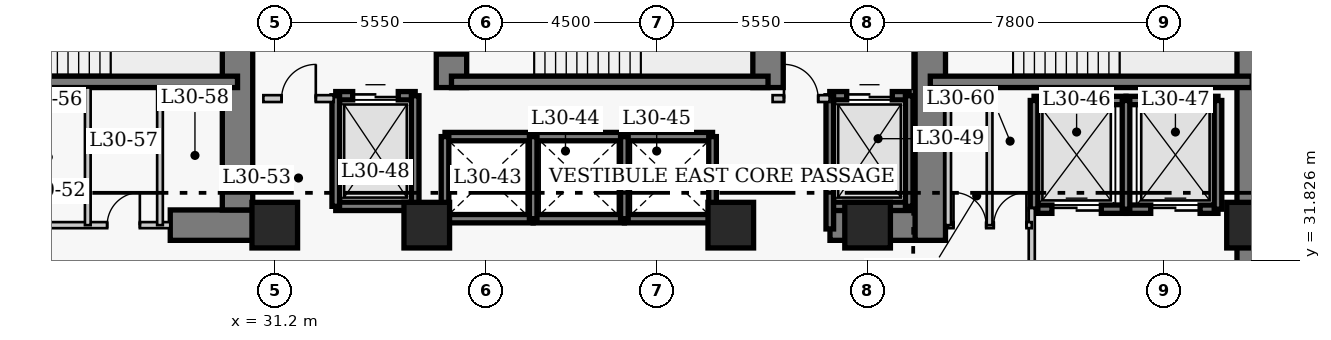
"""IFC4 building model, lengths in metres.
Left out: names, types, materials, properties, quantities, classifications, styles, units other than length and angle.
Written with IfcOpenShell. Run it as: python <this file> out.ifc"""

import sys

from ifc_helpers import new_model, si_unit, direction, frame, frame_2d, origin, origin_2d, place, context, subcontext, project, spatial, rectangle, extrude, element, fill, save


model = new_model("IFC4")
c1 = context("Model", 3, precision=1e-05, world=origin(), true_north=direction((0.0, 1.0)))
c2 = subcontext(c1, "Body", "Model", "MODEL_VIEW")
j1 = project(units=[si_unit("LENGTHUNIT", "METRE"), si_unit("PLANEANGLEUNIT", "RADIAN")], contexts=[c1])
p1 = place(None, origin())
s1 = spatial("IfcSite", under=j1, at=p1, CompositionType="ELEMENT")
p2 = place(p1, origin())
s2 = spatial("IfcBuilding", under=s1, at=p2, CompositionType="ELEMENT")
p3 = place(p2, frame((0.0, 0.0, 122.2)))
s3 = spatial("IfcBuildingStorey", under=s2, at=p3, CompositionType="ELEMENT", Elevation=122.2)
p4 = place(p3, frame((56.92, 27.05, 0.0), z_axis=(0.0, 0.0, 1.0), x_axis=(0.0, 1.0, 0.0)))
e1 = element("IfcWall", 1, at=p4, inside=s3, PredefinedType="SHEAR", context=c2, shape_type="SweptSolid", body=[
    extrude(rectangle(XDim=13.67, YDim=0.8, at=frame_2d((6.835, 0.0))), origin(), (0.0, 0.0, 1.0), 3.8),
])
p5 = place(p3, frame((28.45, 32.75, 0.0), z_axis=(0.0, 0.0, 1.0), x_axis=(1.0, 0.0, 0.0)))
e2 = element("IfcWall", 2, at=p5, inside=s3, PredefinedType="SHEAR", context=c2, shape_type="SweptSolid", body=[
    extrude(rectangle(XDim=2.4, YDim=0.8, at=frame_2d((1.2, 0.0))), origin(), (0.0, 0.0, 1.0), 3.8),
])
p6 = place(p3, frame((45.81, 32.75, 0.0), z_axis=(0.0, 0.0, 1.0), x_axis=(1.0, 0.0, 0.0)))
e3 = element("IfcWall", 3, at=p6, inside=s3, PredefinedType="SHEAR", context=c2, shape_type="SweptSolid", body=[
    extrude(rectangle(XDim=2.64, YDim=0.8, at=frame_2d((1.32, 0.0))), origin(), (0.0, 0.0, 1.0), 3.8),
])
p7 = place(p3, frame((30.22, 33.15, 0.0), z_axis=(0.0, 0.0, 1.0), x_axis=(0.0, 1.0, 0.0)))
e4 = element("IfcWall", 4, at=p7, inside=s3, PredefinedType="SHEAR", context=c2, shape_type="SweptSolid", body=[
    extrude(rectangle(XDim=7.17, YDim=0.8, at=frame_2d((3.585, 0.0))), origin(), (0.0, 0.0, 1.0), 3.8),
])
p8 = place(p3, frame((35.85, 36.37, 0.0), z_axis=(0.0, 0.0, 1.0), x_axis=(0.0, 1.0, 0.0)))
e5 = element("IfcWall", 5, at=p8, inside=s3, PredefinedType="SHEAR", context=c2, shape_type="SweptSolid", body=[
    extrude(rectangle(XDim=3.95, YDim=0.8, at=frame_2d((1.975, 0.0))), origin(), (0.0, 0.0, 1.0), 3.8),
])
p9 = place(p8, frame((0.88, 0.0, 0.0)))
e6 = element("IfcOpeningElement", 6, at=p9, cuts=e5, PredefinedType="OPENING", context=c2, shape_type="SweptSolid", body=[
    extrude(rectangle(XDim=1.1, YDim=2.15, at=frame_2d((0.55, 1.075))), frame((0.0, 0.41, 0.0), z_axis=(0.0, -1.0, 0.0), x_axis=(1.0, 0.0, 0.0)), (0.0, 0.0, 1.0), 0.82),
])
p10 = place(p3, frame((44.18, 36.37, 0.0), z_axis=(0.0, 0.0, 1.0), x_axis=(0.0, 1.0, 0.0)))
e7 = element("IfcWall", 7, at=p10, inside=s3, PredefinedType="SHEAR", context=c2, shape_type="SweptSolid", body=[
    extrude(rectangle(XDim=3.95, YDim=0.8, at=frame_2d((1.975, 0.0))), origin(), (0.0, 0.0, 1.0), 3.8),
])
p11 = place(p3, frame((48.45, 32.35, 0.0), z_axis=(0.0, 0.0, 1.0), x_axis=(0.0, 1.0, 0.0)))
e8 = element("IfcWall", 8, at=p11, inside=s3, PredefinedType="SHEAR", context=c2, shape_type="SweptSolid", body=[
    extrude(rectangle(XDim=7.97, YDim=0.8, at=frame_2d((3.985, 0.0))), origin(), (0.0, 0.0, 1.0), 3.8),
])
p12 = place(p11, frame((5.85, 0.0, 0.0)))
e9 = element("IfcOpeningElement", 9, at=p12, cuts=e8, PredefinedType="OPENING", context=c2, shape_type="SweptSolid", body=[
    extrude(rectangle(XDim=1.1, YDim=2.15, at=frame_2d((0.55, 1.075))), frame((0.0, 0.41, 0.0), z_axis=(0.0, -1.0, 0.0), x_axis=(1.0, 0.0, 0.0)), (0.0, 0.0, 1.0), 0.82),
])
p13 = place(p3, frame((21.9, 36.52, 0.0), z_axis=(0.0, 0.0, 1.0), x_axis=(1.0, 0.0, 0.0)))
e10 = element("IfcWall", 10, at=p13, inside=s3, PredefinedType="SHEAR", context=c2, shape_type="SweptSolid", body=[
    extrude(rectangle(XDim=8.32, YDim=0.3, at=frame_2d((4.16, 0.0))), origin(), (0.0, 0.0, 1.0), 3.8),
])
p14 = place(p13, frame((0.9, 0.0, 0.0)))
e11 = element("IfcOpeningElement", 11, at=p14, cuts=e10, PredefinedType="OPENING", context=c2, shape_type="SweptSolid", body=[
    extrude(rectangle(XDim=1.1, YDim=2.15, at=frame_2d((0.55, 1.075))), frame((0.0, 0.16, 0.0), z_axis=(0.0, -1.0, 0.0), x_axis=(1.0, 0.0, 0.0)), (0.0, 0.0, 1.0), 0.32),
])
p15 = place(p3, frame((35.85, 36.52, 0.0), z_axis=(0.0, 0.0, 1.0), x_axis=(1.0, 0.0, 0.0)))
e12 = element("IfcWall", 12, at=p15, inside=s3, PredefinedType="SHEAR", context=c2, shape_type="SweptSolid", body=[
    extrude(rectangle(XDim=8.33, YDim=0.3, at=frame_2d((4.165, 0.0))), origin(), (0.0, 0.0, 1.0), 3.8),
])
p16 = place(p3, frame((48.45, 36.52, 0.0), z_axis=(0.0, 0.0, 1.0), x_axis=(1.0, 0.0, 0.0)))
e13 = element("IfcWall", 13, at=p16, inside=s3, PredefinedType="SHEAR", context=c2, shape_type="SweptSolid", body=[
    extrude(rectangle(XDim=8.47, YDim=0.3, at=frame_2d((4.235, 0.0))), origin(), (0.0, 0.0, 1.0), 3.8),
])
for number, where, z_axis, x_axis in (
    (14, (31.2, 32.75, 0.0), (0.0, 0.0, 1.0), (1.0, 0.0, 0.0)),
    (15, (35.2, 32.75, 0.0), (0.0, 0.0, 1.0), (1.0, 0.0, 0.0)),
    (16, (43.2, 32.75, 0.0), (0.0, 0.0, 1.0), (1.0, 0.0, 0.0)),
    (17, (46.8, 32.75, 0.0), (0.0, 0.0, 1.0), (1.0, 0.0, 0.0)),
    (18, (56.85, 32.75, 0.0), (0.0, 0.0, 1.0), (1.0, 0.0, 0.0)),
):
    element("IfcColumn", number, at=place(p3, frame(where, z_axis=z_axis, x_axis=x_axis)), inside=s3, PredefinedType="COLUMN", context=c2, shape_type="SweptSolid", body=[
        extrude(rectangle(XDim=1.2, YDim=1.2, at=origin_2d()), origin(), (0.0, 0.0, 1.0), 3.8),
    ])
for number, where, z_axis, x_axis in (
    (19, (35.68, 35.08, 0.0), (0.0, 0.0, 1.0), (1.0, 0.0, 0.0)),
    (20, (35.68, 32.92, 0.0), (0.0, 0.0, 1.0), (1.0, 0.0, 0.0)),
):
    element("IfcWall", number, at=place(p3, frame(where, z_axis=z_axis, x_axis=x_axis)), inside=s3, PredefinedType="SHEAR", context=c2, shape_type="SweptSolid", body=[
        extrude(rectangle(XDim=2.32, YDim=0.22, at=frame_2d((1.16, 0.0))), origin(), (0.0, 0.0, 1.0), 3.8),
    ])
p17 = place(p3, frame((35.68, 32.92, 0.0), z_axis=(0.0, 0.0, 1.0), x_axis=(0.0, 1.0, 0.0)))
e21 = element("IfcWall", 21, at=p17, inside=s3, PredefinedType="SHEAR", context=c2, shape_type="SweptSolid", body=[
    extrude(rectangle(XDim=2.16, YDim=0.2, at=frame_2d((1.08, 0.0))), origin(), (0.0, 0.0, 1.0), 3.8),
])
for number, where, z_axis, x_axis in (
    (22, (38.0, 35.08, 0.0), (0.0, 0.0, 1.0), (1.0, 0.0, 0.0)),
    (23, (38.0, 32.92, 0.0), (0.0, 0.0, 1.0), (1.0, 0.0, 0.0)),
):
    element("IfcWall", number, at=place(p3, frame(where, z_axis=z_axis, x_axis=x_axis)), inside=s3, PredefinedType="SHEAR", context=c2, shape_type="SweptSolid", body=[
        extrude(rectangle(XDim=2.4, YDim=0.22, at=frame_2d((1.2, 0.0))), origin(), (0.0, 0.0, 1.0), 3.8),
    ])
p18 = place(p3, frame((38.0, 32.92, 0.0), z_axis=(0.0, 0.0, 1.0), x_axis=(0.0, 1.0, 0.0)))
e24 = element("IfcWall", 24, at=p18, inside=s3, PredefinedType="SHEAR", context=c2, shape_type="SweptSolid", body=[
    extrude(rectangle(XDim=2.16, YDim=0.2, at=frame_2d((1.08, 0.0))), origin(), (0.0, 0.0, 1.0), 3.8),
])
for number, where, z_axis, x_axis in (
    (25, (40.4, 35.08, 0.0), (0.0, 0.0, 1.0), (1.0, 0.0, 0.0)),
    (26, (40.4, 32.92, 0.0), (0.0, 0.0, 1.0), (1.0, 0.0, 0.0)),
):
    element("IfcWall", number, at=place(p3, frame(where, z_axis=z_axis, x_axis=x_axis)), inside=s3, PredefinedType="SHEAR", context=c2, shape_type="SweptSolid", body=[
        extrude(rectangle(XDim=2.32, YDim=0.22, at=frame_2d((1.16, 0.0))), origin(), (0.0, 0.0, 1.0), 3.8),
    ])
for number, where, z_axis, x_axis in (
    (27, (40.4, 32.92, 0.0), (0.0, 0.0, 1.0), (0.0, 1.0, 0.0)),
    (28, (42.72, 32.92, 0.0), (0.0, 0.0, 1.0), (0.0, 1.0, 0.0)),
):
    element("IfcWall", number, at=place(p3, frame(where, z_axis=z_axis, x_axis=x_axis)), inside=s3, PredefinedType="SHEAR", context=c2, shape_type="SweptSolid", body=[
        extrude(rectangle(XDim=2.16, YDim=0.2, at=frame_2d((1.08, 0.0))), origin(), (0.0, 0.0, 1.0), 3.8),
    ])
p19 = place(p3, frame((51.18, 36.03, 0.0), z_axis=(0.0, 0.0, 1.0), x_axis=(1.0, 0.0, 0.0)))
e29 = element("IfcWall", 29, at=p19, inside=s3, PredefinedType="SHEAR", context=c2, shape_type="SweptSolid", body=[
    extrude(rectangle(XDim=2.42, YDim=0.22, at=frame_2d((1.21, 0.0))), origin(), (0.0, 0.0, 1.0), 3.8),
])
p20 = place(p3, frame((51.18, 33.17, 0.0), z_axis=(0.0, 0.0, 1.0), x_axis=(1.0, 0.0, 0.0)))
e30 = element("IfcWall", 30, at=p20, inside=s3, PredefinedType="SHEAR", context=c2, shape_type="SweptSolid", body=[
    extrude(rectangle(XDim=2.42, YDim=0.22, at=frame_2d((1.21, 0.0))), origin(), (0.0, 0.0, 1.0), 3.8),
])
p21 = place(p20, frame((0.47, 0.0, 0.0)))
e31 = element("IfcOpeningElement", 31, at=p21, cuts=e30, PredefinedType="OPENING", context=c2, shape_type="SweptSolid", body=[
    extrude(rectangle(XDim=1.3, YDim=2.15, at=frame_2d((0.65, 1.075))), frame((0.0, 0.12, 0.0), z_axis=(0.0, -1.0, 0.0), x_axis=(1.0, 0.0, 0.0)), (0.0, 0.0, 1.0), 0.24),
])
p22 = place(p3, frame((51.18, 33.17, 0.0), z_axis=(0.0, 0.0, 1.0), x_axis=(0.0, 1.0, 0.0)))
e32 = element("IfcWall", 32, at=p22, inside=s3, PredefinedType="SHEAR", context=c2, shape_type="SweptSolid", body=[
    extrude(rectangle(XDim=2.86, YDim=0.2, at=frame_2d((1.43, 0.0))), origin(), (0.0, 0.0, 1.0), 3.8),
])
p23 = place(p3, frame((53.6, 36.03, 0.0), z_axis=(0.0, 0.0, 1.0), x_axis=(1.0, 0.0, 0.0)))
e33 = element("IfcWall", 33, at=p23, inside=s3, PredefinedType="SHEAR", context=c2, shape_type="SweptSolid", body=[
    extrude(rectangle(XDim=2.42, YDim=0.22, at=frame_2d((1.21, 0.0))), origin(), (0.0, 0.0, 1.0), 3.8),
])
p24 = place(p3, frame((53.6, 33.17, 0.0), z_axis=(0.0, 0.0, 1.0), x_axis=(1.0, 0.0, 0.0)))
e34 = element("IfcWall", 34, at=p24, inside=s3, PredefinedType="SHEAR", context=c2, shape_type="SweptSolid", body=[
    extrude(rectangle(XDim=2.42, YDim=0.22, at=frame_2d((1.21, 0.0))), origin(), (0.0, 0.0, 1.0), 3.8),
])
p25 = place(p24, frame((0.65, 0.0, 0.0)))
e35 = element("IfcOpeningElement", 35, at=p25, cuts=e34, PredefinedType="OPENING", context=c2, shape_type="SweptSolid", body=[
    extrude(rectangle(XDim=1.3, YDim=2.15, at=frame_2d((0.65, 1.075))), frame((0.0, 0.12, 0.0), z_axis=(0.0, -1.0, 0.0), x_axis=(1.0, 0.0, 0.0)), (0.0, 0.0, 1.0), 0.24),
])
for number, where, z_axis, x_axis in (
    (36, (53.6, 33.17, 0.0), (0.0, 0.0, 1.0), (0.0, 1.0, 0.0)),
    (37, (56.02, 33.17, 0.0), (0.0, 0.0, 1.0), (0.0, 1.0, 0.0)),
):
    element("IfcWall", number, at=place(p3, frame(where, z_axis=z_axis, x_axis=x_axis)), inside=s3, PredefinedType="SHEAR", context=c2, shape_type="SweptSolid", body=[
        extrude(rectangle(XDim=2.86, YDim=0.2, at=frame_2d((1.43, 0.0))), origin(), (0.0, 0.0, 1.0), 3.8),
    ])
p26 = place(p3, frame((32.805, 36.155, 0.0), z_axis=(0.0, 0.0, 1.0), x_axis=(1.0, 0.0, 0.0)))
e38 = element("IfcWall", 38, at=p26, inside=s3, PredefinedType="SHEAR", context=c2, shape_type="SweptSolid", body=[
    extrude(rectangle(XDim=2.09, YDim=0.22, at=frame_2d((1.045, 0.0))), origin(), (0.0, 0.0, 1.0), 3.8),
])
p27 = place(p26, frame((0.445, 0.0, 0.0)))
e39 = element("IfcOpeningElement", 39, at=p27, cuts=e38, PredefinedType="OPENING", context=c2, shape_type="SweptSolid", body=[
    extrude(rectangle(XDim=1.2, YDim=2.15, at=frame_2d((0.6, 1.075))), frame((0.0, 0.12, 0.0), z_axis=(0.0, -1.0, 0.0), x_axis=(1.0, 0.0, 0.0)), (0.0, 0.0, 1.0), 0.24),
])
p28 = place(p3, frame((32.805, 33.245, 0.0), z_axis=(0.0, 0.0, 1.0), x_axis=(1.0, 0.0, 0.0)))
e40 = element("IfcWall", 40, at=p28, inside=s3, PredefinedType="SHEAR", context=c2, shape_type="SweptSolid", body=[
    extrude(rectangle(XDim=2.09, YDim=0.22, at=frame_2d((1.045, 0.0))), origin(), (0.0, 0.0, 1.0), 3.8),
])
for number, where, z_axis, x_axis in (
    (41, (32.805, 33.245, 0.0), (0.0, 0.0, 1.0), (0.0, 1.0, 0.0)),
    (42, (34.895, 33.245, 0.0), (0.0, 0.0, 1.0), (0.0, 1.0, 0.0)),
):
    element("IfcWall", number, at=place(p3, frame(where, z_axis=z_axis, x_axis=x_axis)), inside=s3, PredefinedType="SHEAR", context=c2, shape_type="SweptSolid", body=[
        extrude(rectangle(XDim=2.91, YDim=0.2, at=frame_2d((1.455, 0.0))), origin(), (0.0, 0.0, 1.0), 3.8),
    ])
p29 = place(p3, frame((45.805, 36.155, 0.0), z_axis=(0.0, 0.0, 1.0), x_axis=(1.0, 0.0, 0.0)))
e43 = element("IfcWall", 43, at=p29, inside=s3, PredefinedType="SHEAR", context=c2, shape_type="SweptSolid", body=[
    extrude(rectangle(XDim=2.09, YDim=0.22, at=frame_2d((1.045, 0.0))), origin(), (0.0, 0.0, 1.0), 3.8),
])
p30 = place(p29, frame((0.445, 0.0, 0.0)))
e44 = element("IfcOpeningElement", 44, at=p30, cuts=e43, PredefinedType="OPENING", context=c2, shape_type="SweptSolid", body=[
    extrude(rectangle(XDim=1.2, YDim=2.15, at=frame_2d((0.6, 1.075))), frame((0.0, 0.12, 0.0), z_axis=(0.0, -1.0, 0.0), x_axis=(1.0, 0.0, 0.0)), (0.0, 0.0, 1.0), 0.24),
])
p31 = place(p3, frame((45.805, 33.245, 0.0), z_axis=(0.0, 0.0, 1.0), x_axis=(1.0, 0.0, 0.0)))
e45 = element("IfcWall", 45, at=p31, inside=s3, PredefinedType="SHEAR", context=c2, shape_type="SweptSolid", body=[
    extrude(rectangle(XDim=2.09, YDim=0.22, at=frame_2d((1.045, 0.0))), origin(), (0.0, 0.0, 1.0), 3.8),
])
p32 = place(p3, frame((45.805, 32.65, 0.0), z_axis=(0.0, 0.0, 1.0), x_axis=(0.0, 1.0, 0.0)))
e46 = element("IfcWall", 46, at=p32, inside=s3, PredefinedType="SHEAR", context=c2, shape_type="SweptSolid", body=[
    extrude(rectangle(XDim=3.505, YDim=0.2, at=frame_2d((1.752, 0.0))), origin(), (0.0, 0.0, 1.0), 3.8),
])
p33 = place(p3, frame((47.895, 33.245, 0.0), z_axis=(0.0, 0.0, 1.0), x_axis=(0.0, 1.0, 0.0)))
e47 = element("IfcWall", 47, at=p33, inside=s3, PredefinedType="SHEAR", context=c2, shape_type="SweptSolid", body=[
    extrude(rectangle(XDim=2.91, YDim=0.2, at=frame_2d((1.455, 0.0))), origin(), (0.0, 0.0, 1.0), 3.8),
])
p34 = place(p3, frame((30.9, 36.08, 0.0), z_axis=(0.0, 0.0, 1.0), x_axis=(1.0, 0.0, 0.0)))
e48 = element("IfcWall", 48, at=p34, inside=s3, PredefinedType="PARTITIONING", context=c2, shape_type="SweptSolid", body=[
    extrude(rectangle(XDim=1.85, YDim=0.18, at=frame_2d((0.925, 0.0))), origin(), (0.0, 0.0, 1.0), 3.54),
])
p35 = place(p34, frame((0.48, 0.0, 0.0)))
e49 = element("IfcOpeningElement", 49, at=p35, cuts=e48, PredefinedType="OPENING", context=c2, shape_type="SweptSolid", body=[
    extrude(rectangle(XDim=0.9, YDim=2.15, at=frame_2d((0.45, 1.075))), frame((0.0, 0.1, 0.0), z_axis=(0.0, -1.0, 0.0), x_axis=(1.0, 0.0, 0.0)), (0.0, 0.0, 1.0), 0.2),
])
p36 = place(p3, frame((44.3, 36.08, 0.0), z_axis=(0.0, 0.0, 1.0), x_axis=(1.0, 0.0, 0.0)))
e50 = element("IfcWall", 50, at=p36, inside=s3, PredefinedType="PARTITIONING", context=c2, shape_type="SweptSolid", body=[
    extrude(rectangle(XDim=1.5, YDim=0.18, at=frame_2d((0.75, 0.0))), origin(), (0.0, 0.0, 1.0), 3.54),
])
p37 = place(p36, frame((0.3, 0.0, 0.0)))
e51 = element("IfcOpeningElement", 51, at=p37, cuts=e50, PredefinedType="OPENING", context=c2, shape_type="SweptSolid", body=[
    extrude(rectangle(XDim=0.9, YDim=2.15, at=frame_2d((0.45, 1.075))), frame((0.0, 0.1, 0.0), z_axis=(0.0, -1.0, 0.0), x_axis=(1.0, 0.0, 0.0)), (0.0, 0.0, 1.0), 0.2),
])
p38 = place(p3, frame((51.12, 29.5, 0.0), z_axis=(0.0, 0.0, 1.0), x_axis=(0.0, 1.0, 0.0)))
e52 = element("IfcWall", 52, at=p38, inside=s3, PredefinedType="PARTITIONING", context=c2, shape_type="SweptSolid", body=[
    extrude(rectangle(XDim=3.7, YDim=0.16, at=frame_2d((1.85, 0.0))), origin(), (0.0, 0.0, 1.0), 3.54),
])
p39 = place(p38, frame((0.9, 0.0, 0.0)))
e53 = element("IfcOpeningElement", 53, at=p39, cuts=e52, PredefinedType="OPENING", context=c2, shape_type="SweptSolid", body=[
    extrude(rectangle(XDim=1.1, YDim=2.15, at=frame_2d((0.55, 1.075))), frame((0.0, 0.09, 0.0), z_axis=(0.0, -1.0, 0.0), x_axis=(1.0, 0.0, 0.0)), (0.0, 0.0, 1.0), 0.18),
])
p40 = place(p3, frame((24.48, 32.75, 0.0), z_axis=(0.0, 0.0, 1.0), x_axis=(1.0, 0.0, 0.0)))
e54 = element("IfcWall", 54, at=p40, inside=s3, PredefinedType="PARTITIONING", context=c2, shape_type="SweptSolid", body=[
    extrude(rectangle(XDim=3.97, YDim=0.16, at=frame_2d((1.985, 0.0))), origin(), (0.0, 0.0, 1.0), 3.54),
])
p41 = place(p40, frame((2.31, 0.0, 0.0)))
e55 = element("IfcOpeningElement", 55, at=p41, cuts=e54, PredefinedType="OPENING", context=c2, shape_type="SweptSolid", body=[
    extrude(rectangle(XDim=0.86, YDim=2.05, at=frame_2d((0.43, 1.025))), frame((0.0, 0.09, 0.0), z_axis=(0.0, -1.0, 0.0), x_axis=(1.0, 0.0, 0.0)), (0.0, 0.0, 1.0), 0.18),
])
p42 = place(p3, frame((48.92, 32.75, 0.0), z_axis=(0.0, 0.0, 1.0), x_axis=(1.0, 0.0, 0.0)))
e56 = element("IfcWall", 56, at=p42, inside=s3, PredefinedType="PARTITIONING", context=c2, shape_type="SweptSolid", body=[
    extrude(rectangle(XDim=2.2, YDim=0.16, at=frame_2d((1.1, 0.0))), origin(), (0.0, 0.0, 1.0), 3.54),
])
p43 = place(p42, frame((0.14, 0.0, 0.0)))
e57 = element("IfcOpeningElement", 57, at=p43, cuts=e56, PredefinedType="OPENING", context=c2, shape_type="SweptSolid", body=[
    extrude(rectangle(XDim=0.86, YDim=2.05, at=frame_2d((0.43, 1.025))), frame((0.0, 0.09, 0.0), z_axis=(0.0, -1.0, 0.0), x_axis=(1.0, 0.0, 0.0)), (0.0, 0.0, 1.0), 0.18),
])
p44 = place(p42, frame((1.2, 0.0, 0.0)))
e58 = element("IfcOpeningElement", 58, at=p44, cuts=e56, PredefinedType="OPENING", context=c2, shape_type="SweptSolid", body=[
    extrude(rectangle(XDim=0.86, YDim=2.05, at=frame_2d((0.43, 1.025))), frame((0.0, 0.09, 0.0), z_axis=(0.0, -1.0, 0.0), x_axis=(1.0, 0.0, 0.0)), (0.0, 0.0, 1.0), 0.18),
])
for number, where, z_axis, x_axis in (
    (59, (48.92, 32.75, 0.0), (0.0, 0.0, 1.0), (0.0, 1.0, 0.0)),
    (60, (26.28, 32.75, 0.0), (0.0, 0.0, 1.0), (0.0, 1.0, 0.0)),
    (61, (28.18, 32.75, 0.0), (0.0, 0.0, 1.0), (0.0, 1.0, 0.0)),
    (62, (50.01, 32.75, 0.0), (0.0, 0.0, 1.0), (0.0, 1.0, 0.0)),
):
    element("IfcWall", number, at=place(p3, frame(where, z_axis=z_axis, x_axis=x_axis)), inside=s3, PredefinedType="PARTITIONING", context=c2, shape_type="SweptSolid", body=[
        extrude(rectangle(XDim=3.62, YDim=0.15, at=frame_2d((1.81, 0.0))), origin(), (0.0, 0.0, 1.0), 3.54),
    ])
p45 = place(p21, origin())
e63 = element("IfcDoor", 63, at=p45, inside=s3, OperationType="DOUBLE_DOOR_SLIDING", PredefinedType="DOOR", context=c2, shape_type="SweptSolid", body=[
    extrude(rectangle(XDim=1.3, YDim=2.15, at=frame_2d((0.65, 1.075))), frame((0.0, 0.025, 0.0), z_axis=(0.0, -1.0, 0.0), x_axis=(1.0, 0.0, 0.0)), (0.0, 0.0, 1.0), 0.05),
])
fill(e31, e63)
p46 = place(p25, origin())
e64 = element("IfcDoor", 64, at=p46, inside=s3, OperationType="DOUBLE_DOOR_SLIDING", PredefinedType="DOOR", context=c2, shape_type="SweptSolid", body=[
    extrude(rectangle(XDim=1.3, YDim=2.15, at=frame_2d((0.65, 1.075))), frame((0.0, 0.025, 0.0), z_axis=(0.0, -1.0, 0.0), x_axis=(1.0, 0.0, 0.0)), (0.0, 0.0, 1.0), 0.05),
])
fill(e35, e64)
p47 = place(p27, origin())
e65 = element("IfcDoor", 65, at=p47, inside=s3, OperationType="DOUBLE_DOOR_SLIDING", PredefinedType="DOOR", context=c2, shape_type="SweptSolid", body=[
    extrude(rectangle(XDim=1.2, YDim=2.15, at=frame_2d((0.6, 1.075))), frame((0.0, 0.025, 0.0), z_axis=(0.0, -1.0, 0.0), x_axis=(1.0, 0.0, 0.0)), (0.0, 0.0, 1.0), 0.05),
])
fill(e39, e65)
p48 = place(p30, origin())
e66 = element("IfcDoor", 66, at=p48, inside=s3, OperationType="DOUBLE_DOOR_SLIDING", PredefinedType="DOOR", context=c2, shape_type="SweptSolid", body=[
    extrude(rectangle(XDim=1.2, YDim=2.15, at=frame_2d((0.6, 1.075))), frame((0.0, 0.025, 0.0), z_axis=(0.0, -1.0, 0.0), x_axis=(1.0, 0.0, 0.0)), (0.0, 0.0, 1.0), 0.05),
])
fill(e44, e66)
p49 = place(p35, origin())
e67 = element("IfcDoor", 67, at=p49, inside=s3, OperationType="SINGLE_SWING_RIGHT", PredefinedType="DOOR", context=c2, shape_type="SweptSolid", body=[
    extrude(rectangle(XDim=0.9, YDim=2.15, at=frame_2d((0.45, 1.075))), frame((0.0, 0.025, 0.0), z_axis=(0.0, -1.0, 0.0), x_axis=(1.0, 0.0, 0.0)), (0.0, 0.0, 1.0), 0.05),
])
fill(e49, e67)
p50 = place(p37, origin())
e68 = element("IfcDoor", 68, at=p50, inside=s3, OperationType="SINGLE_SWING_LEFT", PredefinedType="DOOR", context=c2, shape_type="SweptSolid", body=[
    extrude(rectangle(XDim=0.9, YDim=2.15, at=frame_2d((0.45, 1.075))), frame((0.0, 0.025, 0.0), z_axis=(0.0, -1.0, 0.0), x_axis=(1.0, 0.0, 0.0)), (0.0, 0.0, 1.0), 0.05),
])
fill(e51, e68)
p51 = place(p41, origin())
e69 = element("IfcDoor", 69, at=p51, inside=s3, OperationType="SINGLE_SWING_RIGHT", PredefinedType="DOOR", context=c2, shape_type="SweptSolid", body=[
    extrude(rectangle(XDim=0.86, YDim=2.05, at=frame_2d((0.43, 1.025))), frame((0.0, 0.025, 0.0), z_axis=(0.0, -1.0, 0.0), x_axis=(1.0, 0.0, 0.0)), (0.0, 0.0, 1.0), 0.05),
])
fill(e55, e69)
p52 = place(p43, origin())
e70 = element("IfcDoor", 70, at=p52, inside=s3, OperationType="SINGLE_SWING_LEFT", PredefinedType="DOOR", context=c2, shape_type="SweptSolid", body=[
    extrude(rectangle(XDim=0.86, YDim=2.05, at=frame_2d((0.43, 1.025))), frame((0.0, 0.025, 0.0), z_axis=(0.0, -1.0, 0.0), x_axis=(1.0, 0.0, 0.0)), (0.0, 0.0, 1.0), 0.05),
])
fill(e57, e70)
p53 = place(p44, origin())
e71 = element("IfcDoor", 71, at=p53, inside=s3, OperationType="SINGLE_SWING_RIGHT", PredefinedType="DOOR", context=c2, shape_type="SweptSolid", body=[
    extrude(rectangle(XDim=0.86, YDim=2.05, at=frame_2d((0.43, 1.025))), frame((0.0, 0.025, 0.0), z_axis=(0.0, -1.0, 0.0), x_axis=(1.0, 0.0, 0.0)), (0.0, 0.0, 1.0), 0.05),
])
fill(e58, e71)
p54 = place(p9, origin())
e72 = element("IfcDoor", 72, at=p54, inside=s3, OperationType="SINGLE_SWING_RIGHT", PredefinedType="DOOR", context=c2, shape_type="SweptSolid", body=[
    extrude(rectangle(XDim=1.1, YDim=2.15, at=frame_2d((0.55, 1.075))), frame((0.0, 0.025, 0.0), z_axis=(0.0, -1.0, 0.0), x_axis=(1.0, 0.0, 0.0)), (0.0, 0.0, 1.0), 0.05),
])
fill(e6, e72)
save(model, sys.argv[1])
